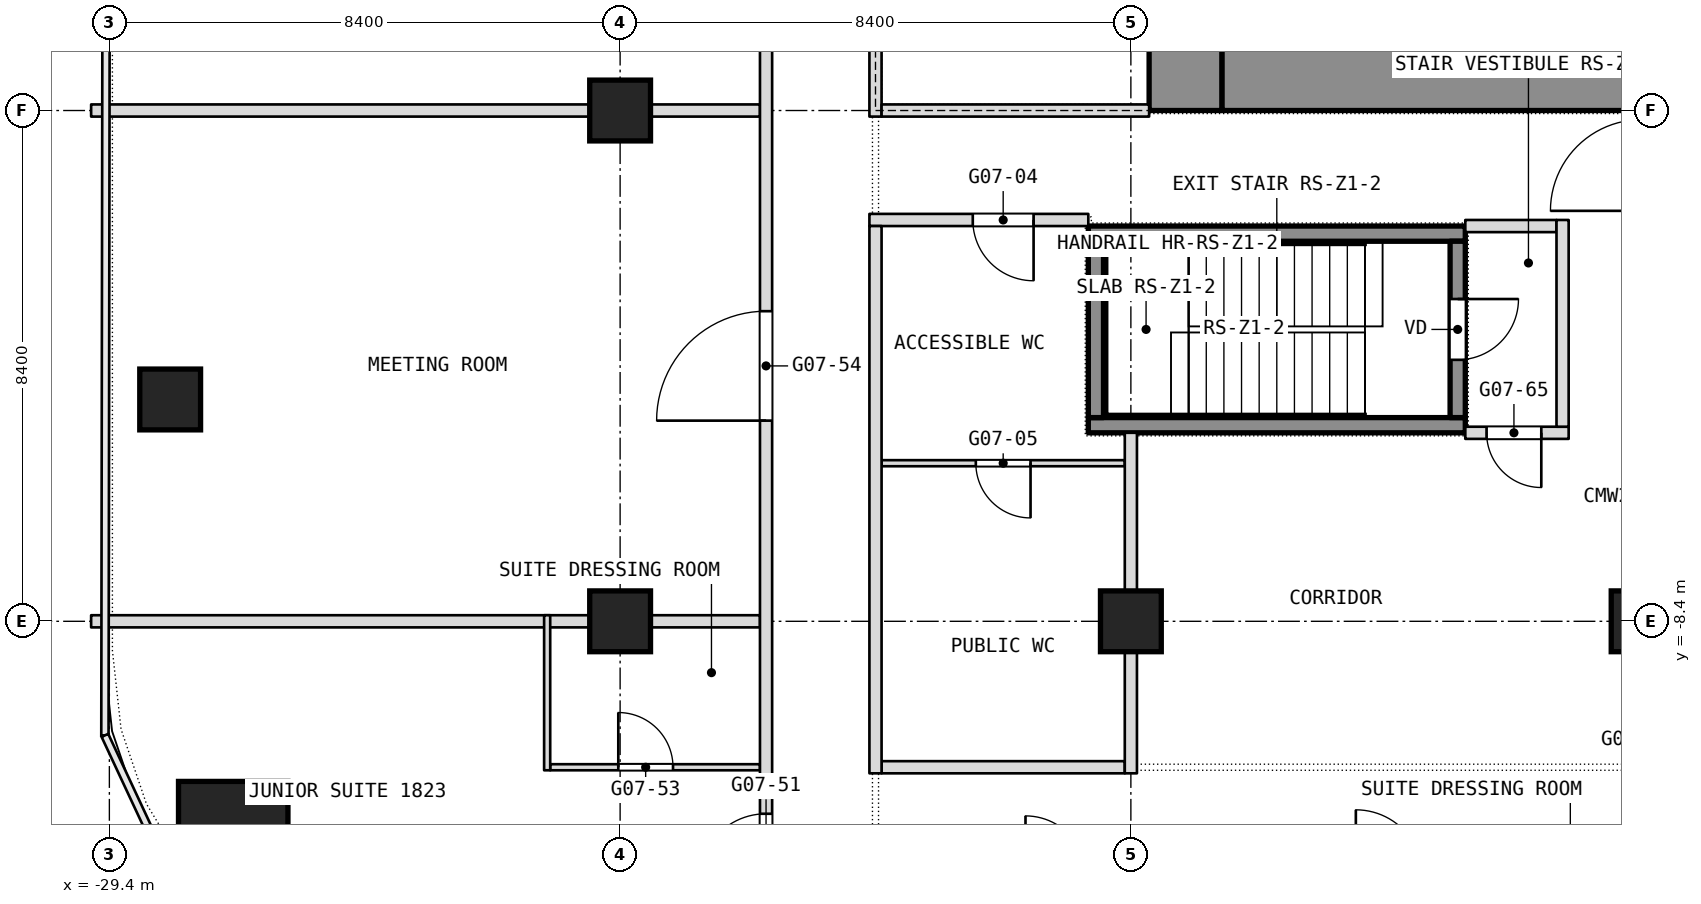
"""IFC4 building model, lengths in metres.
Left out: names, types, materials, properties, quantities, classifications, styles, units other than length and angle.
Written with IfcOpenShell. Run it as: python <this file> out.ifc"""

import sys

from ifc_helpers import new_model, si_unit, direction, frame, frame_2d, origin, origin_2d, place, context, subcontext, project, spatial, rectangle, extrude, element, fill, save


model = new_model("IFC4")
c1 = context("Model", 3, precision=1e-05, world=origin(), true_north=direction((0.0, 1.0)))
c2 = subcontext(c1, "Body", "Model", "MODEL_VIEW")
j1 = project(units=[si_unit("LENGTHUNIT", "METRE"), si_unit("PLANEANGLEUNIT", "RADIAN")], contexts=[c1])
p1 = place(None, origin())
s1 = spatial("IfcSite", under=j1, at=p1, CompositionType="ELEMENT")
p2 = place(p1, origin())
s2 = spatial("IfcBuilding", under=s1, at=p2, CompositionType="ELEMENT")
p3 = place(p2, frame((0.0, 0.0, 79.7)))
s3 = spatial("IfcBuildingStorey", under=s2, at=p3, CompositionType="ELEMENT", Elevation=79.7)
p4 = place(p3, frame((-11.7, 0.0, 0.0), z_axis=(0.0, 0.0, 1.0), x_axis=(0.0, 1.0, 0.0)))
e1 = element("IfcWall", 1, at=p4, inside=s3, PredefinedType="SHEAR", context=c2, shape_type="SweptSolid", body=[
    extrude(rectangle(XDim=16.8, YDim=1.2, at=frame_2d((8.4, 0.0))), origin(), (0.0, 0.0, 1.0), 3.6),
])
p5 = place(p4, frame((2.3, 0.0, 0.0)))
e2 = element("IfcOpeningElement", 2, at=p5, cuts=e1, PredefinedType="OPENING", context=c2, shape_type="SweptSolid", body=[
    extrude(rectangle(XDim=1.1, YDim=2.1, at=frame_2d((0.55, 1.05))), frame((0.0, 0.6, 0.0), z_axis=(0.0, -1.0, 0.0), x_axis=(1.0, 0.0, 0.0)), (0.0, 0.0, 1.0), 1.2),
])
p6 = place(p4, frame((4.85, 0.0, 0.0)))
e3 = element("IfcOpeningElement", 3, at=p6, cuts=e1, PredefinedType="OPENING", context=c2, shape_type="SweptSolid", body=[
    extrude(rectangle(XDim=1.1, YDim=2.1, at=frame_2d((0.55, 1.05))), frame((0.0, 0.6, 0.0), z_axis=(0.0, -1.0, 0.0), x_axis=(1.0, 0.0, 0.0)), (0.0, 0.0, 1.0), 1.2),
])
p7 = place(p4, frame((6.825, 0.0, 0.0)))
e4 = element("IfcOpeningElement", 4, at=p7, cuts=e1, PredefinedType="OPENING", context=c2, shape_type="SweptSolid", body=[
    extrude(rectangle(XDim=1.2, YDim=2.1, at=frame_2d((0.6, 1.05))), frame((0.0, 0.6, 0.0), z_axis=(0.0, -1.0, 0.0), x_axis=(1.0, 0.0, 0.0)), (0.0, 0.0, 1.0), 1.2),
])
p8 = place(p4, frame((13.4, 0.0, 0.0)))
e5 = element("IfcOpeningElement", 5, at=p8, cuts=e1, PredefinedType="OPENING", context=c2, shape_type="SweptSolid", body=[
    extrude(rectangle(XDim=1.1, YDim=2.1, at=frame_2d((0.55, 1.05))), frame((0.0, 0.6, 0.0), z_axis=(0.0, -1.0, 0.0), x_axis=(1.0, 0.0, 0.0)), (0.0, 0.0, 1.0), 1.2),
])
p9 = place(p4, frame((10.85, 0.0, 0.0)))
e6 = element("IfcOpeningElement", 6, at=p9, cuts=e1, PredefinedType="OPENING", context=c2, shape_type="SweptSolid", body=[
    extrude(rectangle(XDim=1.1, YDim=2.1, at=frame_2d((0.55, 1.05))), frame((0.0, 0.6, 0.0), z_axis=(0.0, -1.0, 0.0), x_axis=(1.0, 0.0, 0.0)), (0.0, 0.0, 1.0), 1.2),
])
p10 = place(p4, frame((8.775, 0.0, 0.0)))
e7 = element("IfcOpeningElement", 7, at=p10, cuts=e1, PredefinedType="OPENING", context=c2, shape_type="SweptSolid", body=[
    extrude(rectangle(XDim=1.2, YDim=2.1, at=frame_2d((0.6, 1.05))), frame((0.0, 0.6, 0.0), z_axis=(0.0, -1.0, 0.0), x_axis=(1.0, 0.0, 0.0)), (0.0, 0.0, 1.0), 1.2),
])
p11 = place(p3, frame((-11.1, 0.6, 0.0), z_axis=(0.0, 0.0, 1.0), x_axis=(1.0, 0.0, 0.0)))
e8 = element("IfcWall", 8, at=p11, inside=s3, PredefinedType="SHEAR", context=c2, shape_type="SweptSolid", body=[
    extrude(rectangle(XDim=22.2, YDim=1.2, at=frame_2d((11.1, 0.0))), origin(), (0.0, 0.0, 1.0), 3.6),
])
p12 = place(p3, frame((-27.363, -11.933, 0.0), z_axis=(0.0, 0.0, 1.0), x_axis=(1.0, 0.0, 0.0)))
e9 = element("IfcColumn", 9, at=p12, inside=s3, PredefinedType="COLUMN", context=c2, shape_type="SweptSolid", body=[
    extrude(rectangle(XDim=1.8, YDim=1.8, at=origin_2d()), origin(), (0.0, 0.0, 1.0), 3.6),
])
for number, where, z_axis, x_axis in (
    (10, (-21.0, -8.4, 0.0), (0.0, 0.0, 1.0), (1.0, 0.0, 0.0)),
    (11, (-21.0, 0.0, 0.0), (0.0, 0.0, 1.0), (1.0, 0.0, 0.0)),
    (12, (-12.6, -8.4, 0.0), (0.0, 0.0, 1.0), (1.0, 0.0, 0.0)),
    (13, (-4.2, -8.4, 0.0), (0.0, 0.0, 1.0), (1.0, 0.0, 0.0)),
    (14, (-28.4, -4.752, 0.0), (0.0, 0.0, 1.0), (1.0, 0.0, 0.0)),
):
    element("IfcColumn", number, at=place(p3, frame(where, z_axis=z_axis, x_axis=x_axis)), inside=s3, PredefinedType="COLUMN", context=c2, shape_type="SweptSolid", body=[
        extrude(rectangle(XDim=1.0, YDim=1.0, at=origin_2d()), origin(), (0.0, 0.0, 1.0), 3.6),
    ])
p13 = place(p3, frame((-22.15, -10.8, 0.0), z_axis=(0.0, 0.0, 1.0), x_axis=(1.0, 0.0, 0.0)))
e15 = element("IfcWall", 15, at=p13, inside=s3, PredefinedType="PARTITIONING", context=c2, shape_type="SweptSolid", body=[
    extrude(rectangle(XDim=3.45, YDim=0.1, at=frame_2d((1.725, 0.0))), origin(), (0.0, 0.0, 1.0), 3.34),
])
p14 = place(p13, frame((1.12, 0.0, 0.0)))
e16 = element("IfcOpeningElement", 16, at=p14, cuts=e15, PredefinedType="OPENING", context=c2, shape_type="SweptSolid", body=[
    extrude(rectangle(XDim=0.9, YDim=2.1, at=frame_2d((0.45, 1.05))), frame((0.0, 0.05, 0.0), z_axis=(0.0, -1.0, 0.0), x_axis=(1.0, 0.0, 0.0)), (0.0, 0.0, 1.0), 0.1),
])
p15 = place(p3, frame((-16.7, -10.8, 0.0), z_axis=(0.0, 0.0, 1.0), x_axis=(1.0, 0.0, 0.0)))
e17 = element("IfcWall", 17, at=p15, inside=s3, PredefinedType="PARTITIONING", context=c2, shape_type="SweptSolid", body=[
    extrude(rectangle(XDim=4.0, YDim=0.2, at=frame_2d((2.0, 0.0))), origin(), (0.0, 0.0, 1.0), 3.34),
])
p16 = place(p3, frame((-29.7, -8.4, 0.0), z_axis=(0.0, 0.0, 1.0), x_axis=(1.0, 0.0, 0.0)))
e18 = element("IfcWall", 18, at=p16, inside=s3, PredefinedType="PARTITIONING", context=c2, shape_type="SweptSolid", body=[
    extrude(rectangle(XDim=11.0, YDim=0.2, at=frame_2d((5.5, 0.0))), origin(), (0.0, 0.0, 1.0), 2.84),
])
p17 = place(p3, frame((-16.7, -5.8, 0.0), z_axis=(0.0, 0.0, 1.0), x_axis=(1.0, 0.0, 0.0)))
e19 = element("IfcWall", 19, at=p17, inside=s3, PredefinedType="PARTITIONING", context=c2, shape_type="SweptSolid", body=[
    extrude(rectangle(XDim=4.0, YDim=0.1, at=frame_2d((2.0, 0.0))), origin(), (0.0, 0.0, 1.0), 3.34),
])
p18 = place(p17, frame((1.55, 0.0, 0.0)))
e20 = element("IfcOpeningElement", 20, at=p18, cuts=e19, PredefinedType="OPENING", context=c2, shape_type="SweptSolid", body=[
    extrude(rectangle(XDim=0.9, YDim=2.1, at=frame_2d((0.45, 1.05))), frame((0.0, 0.05, 0.0), z_axis=(0.0, -1.0, 0.0), x_axis=(1.0, 0.0, 0.0)), (0.0, 0.0, 1.0), 0.1),
])
p19 = place(p3, frame((-7.1, -5.3, 0.0), z_axis=(0.0, 0.0, 1.0), x_axis=(1.0, 0.0, 0.0)))
e21 = element("IfcWall", 21, at=p19, inside=s3, PredefinedType="PARTITIONING", context=c2, shape_type="SweptSolid", body=[
    extrude(rectangle(XDim=1.7, YDim=0.2, at=frame_2d((0.85, 0.0))), origin(), (0.0, 0.0, 1.0), 3.34),
])
p20 = place(p19, frame((0.35, 0.0, 0.0)))
e22 = element("IfcOpeningElement", 22, at=p20, cuts=e21, PredefinedType="OPENING", context=c2, shape_type="SweptSolid", body=[
    extrude(rectangle(XDim=0.9, YDim=2.1, at=frame_2d((0.45, 1.05))), frame((0.0, 0.1, 0.0), z_axis=(0.0, -1.0, 0.0), x_axis=(1.0, 0.0, 0.0)), (0.0, 0.0, 1.0), 0.2),
])
p21 = place(p3, frame((-7.1, -1.9, 0.0), z_axis=(0.0, 0.0, 1.0), x_axis=(1.0, 0.0, 0.0)))
e23 = element("IfcWall", 23, at=p21, inside=s3, PredefinedType="PARTITIONING", context=c2, shape_type="SweptSolid", body=[
    extrude(rectangle(XDim=1.5, YDim=0.2, at=frame_2d((0.75, 0.0))), origin(), (0.0, 0.0, 1.0), 3.34),
])
p22 = place(p3, frame((-16.9, -1.8, 0.0), z_axis=(0.0, 0.0, 1.0), x_axis=(1.0, 0.0, 0.0)))
e24 = element("IfcWall", 24, at=p22, inside=s3, PredefinedType="PARTITIONING", context=c2, shape_type="SweptSolid", body=[
    extrude(rectangle(XDim=3.6, YDim=0.2, at=frame_2d((1.8, 0.0))), origin(), (0.0, 0.0, 1.0), 3.34),
])
p23 = place(p22, frame((1.7, 0.0, 0.0)))
e25 = element("IfcOpeningElement", 25, at=p23, cuts=e24, PredefinedType="OPENING", context=c2, shape_type="SweptSolid", body=[
    extrude(rectangle(XDim=1.0, YDim=2.1, at=frame_2d((0.5, 1.05))), frame((0.0, 0.1, 0.0), z_axis=(0.0, -1.0, 0.0), x_axis=(1.0, 0.0, 0.0)), (0.0, 0.0, 1.0), 0.2),
])
p24 = place(p3, frame((-29.7, 0.0, 0.0), z_axis=(0.0, 0.0, 1.0), x_axis=(1.0, 0.0, 0.0)))
e26 = element("IfcWall", 26, at=p24, inside=s3, PredefinedType="PARTITIONING", context=c2, shape_type="SweptSolid", body=[
    extrude(rectangle(XDim=11.0, YDim=0.2, at=frame_2d((5.5, 0.0))), origin(), (0.0, 0.0, 1.0), 2.84),
])
p25 = place(p3, frame((-5.5, -5.2, 0.0), z_axis=(0.0, 0.0, 1.0), x_axis=(0.0, 1.0, 0.0)))
e27 = element("IfcWall", 27, at=p25, inside=s3, PredefinedType="PARTITIONING", context=c2, shape_type="SweptSolid", body=[
    extrude(rectangle(XDim=3.4, YDim=0.2, at=frame_2d((1.7, 0.0))), origin(), (0.0, 0.0, 1.0), 3.34),
])
p26 = place(p3, frame((-12.6, -10.9, 0.0), z_axis=(0.0, 0.0, 1.0), x_axis=(0.0, 1.0, 0.0)))
e28 = element("IfcWall", 28, at=p26, inside=s3, PredefinedType="PARTITIONING", context=c2, shape_type="SweptSolid", body=[
    extrude(rectangle(XDim=5.6, YDim=0.2, at=frame_2d((2.8, 0.0))), origin(), (0.0, 0.0, 1.0), 3.34),
])
p27 = place(p3, frame((-16.8, -10.9, 0.0), z_axis=(0.0, 0.0, 1.0), x_axis=(0.0, 1.0, 0.0)))
e29 = element("IfcWall", 29, at=p27, inside=s3, PredefinedType="PARTITIONING", context=c2, shape_type="SweptSolid", body=[
    extrude(rectangle(XDim=9.0, YDim=0.2, at=frame_2d((4.5, 0.0))), origin(), (0.0, 0.0, 1.0), 3.34),
])
p28 = place(p3, frame((-18.6, -16.665, 0.0), z_axis=(0.0, 0.0, 1.0), x_axis=(0.0, 1.0, 0.0)))
e30 = element("IfcWall", 30, at=p28, inside=s3, PredefinedType="PARTITIONING", context=c2, shape_type="SweptSolid", body=[
    extrude(rectangle(XDim=23.565, YDim=0.2, at=frame_2d((11.782, 0.0))), origin(), (0.0, 0.0, 1.0), 3.34),
])
p29 = place(p28, frame((4.0, 0.0, 0.0)))
e31 = element("IfcOpeningElement", 31, at=p29, cuts=e30, PredefinedType="OPENING", context=c2, shape_type="SweptSolid", body=[
    extrude(rectangle(XDim=1.1, YDim=2.1, at=frame_2d((0.55, 1.05))), frame((0.0, 0.1, 0.0), z_axis=(0.0, -1.0, 0.0), x_axis=(1.0, 0.0, 0.0)), (0.0, 0.0, 1.0), 0.2),
])
p30 = place(p28, frame((11.565, 0.0, 0.0)))
e32 = element("IfcOpeningElement", 32, at=p30, cuts=e30, PredefinedType="OPENING", context=c2, shape_type="SweptSolid", body=[
    extrude(rectangle(XDim=1.8, YDim=2.1, at=frame_2d((0.9, 1.05))), frame((0.0, 0.1, 0.0), z_axis=(0.0, -1.0, 0.0), x_axis=(1.0, 0.0, 0.0)), (0.0, 0.0, 1.0), 0.2),
])
p31 = place(p28, frame((19.965, 0.0, 0.0)))
e33 = element("IfcOpeningElement", 33, at=p31, cuts=e30, PredefinedType="OPENING", context=c2, shape_type="SweptSolid", body=[
    extrude(rectangle(XDim=1.8, YDim=2.1, at=frame_2d((0.9, 1.05))), frame((0.0, 0.1, 0.0), z_axis=(0.0, -1.0, 0.0), x_axis=(1.0, 0.0, 0.0)), (0.0, 0.0, 1.0), 0.2),
])
p32 = place(p3, frame((-22.2, -10.85, 0.0), z_axis=(0.0, 0.0, 1.0), x_axis=(0.0, 1.0, 0.0)))
e34 = element("IfcWall", 34, at=p32, inside=s3, PredefinedType="PARTITIONING", context=c2, shape_type="SweptSolid", body=[
    extrude(rectangle(XDim=2.55, YDim=0.1, at=frame_2d((1.275, 0.0))), origin(), (0.0, 0.0, 1.0), 3.34),
])
p33 = place(p3, frame((-16.8, -0.1, 0.0), z_axis=(0.0, 0.0, 1.0), x_axis=(0.0, 1.0, 0.0)))
e35 = element("IfcWall", 35, at=p33, inside=s3, PredefinedType="PARTITIONING", context=c2, shape_type="SweptSolid", body=[
    extrude(rectangle(XDim=17.0, YDim=0.2, at=frame_2d((8.5, 0.0))), origin(), (0.0, 0.0, 1.0), 3.34),
])
p34 = place(p33, frame((2.2, 0.0, 0.0)))
e36 = element("IfcOpeningElement", 36, at=p34, cuts=e35, PredefinedType="OPENING", context=c2, shape_type="SweptSolid", body=[
    extrude(rectangle(XDim=1.8, YDim=2.1, at=frame_2d((0.9, 1.05))), frame((0.0, 0.1, 0.0), z_axis=(0.0, -1.0, 0.0), x_axis=(1.0, 0.0, 0.0)), (0.0, 0.0, 1.0), 0.2),
])
p35 = place(p33, frame((7.2, 0.0, 0.0)))
e37 = element("IfcOpeningElement", 37, at=p35, cuts=e35, PredefinedType="OPENING", context=c2, shape_type="SweptSolid", body=[
    extrude(rectangle(XDim=1.8, YDim=2.1, at=frame_2d((0.9, 1.05))), frame((0.0, 0.1, 0.0), z_axis=(0.0, -1.0, 0.0), x_axis=(1.0, 0.0, 0.0)), (0.0, 0.0, 1.0), 0.2),
])
p36 = place(p3, frame((-16.7, 0.0, 0.0), z_axis=(0.0, 0.0, 1.0), x_axis=(1.0, 0.0, 0.0)))
e38 = element("IfcWall", 38, at=p36, inside=s3, PredefinedType="PARTITIONING", context=c2, shape_type="SweptSolid", body=[
    extrude(rectangle(XDim=4.4, YDim=0.2, at=frame_2d((2.2, 0.0))), origin(), (0.0, 0.0, 1.0), 2.84),
])
for number, where, z_axis, x_axis in (
    (39, (-13.3, -5.175, 0.1), (0.0, 0.0, 1.0), (1.0, 0.0, 0.0)),
    (40, (-13.3, -2.025, 0.1), (0.0, 0.0, 1.0), (1.0, 0.0, 0.0)),
):
    element("IfcWall", number, at=place(p3, frame(where, z_axis=z_axis, x_axis=x_axis)), inside=s3, PredefinedType="SHEAR", context=c2, shape_type="SweptSolid", body=[
        extrude(rectangle(XDim=6.2, YDim=0.25, at=frame_2d((3.1, 0.0))), origin(), (0.0, 0.0, 1.0), 3.6),
    ])
p37 = place(p3, frame((-13.175, -5.05, 0.1), z_axis=(0.0, 0.0, 1.0), x_axis=(0.0, 1.0, 0.0)))
e41 = element("IfcWall", 41, at=p37, inside=s3, PredefinedType="SHEAR", context=c2, shape_type="SweptSolid", body=[
    extrude(rectangle(XDim=2.9, YDim=0.25, at=frame_2d((1.45, 0.0))), origin(), (0.0, 0.0, 1.0), 3.6),
])
p38 = place(p3, frame((-7.225, -5.05, 0.1), z_axis=(0.0, 0.0, 1.0), x_axis=(0.0, 1.0, 0.0)))
e42 = element("IfcWall", 42, at=p38, inside=s3, PredefinedType="SHEAR", context=c2, shape_type="SweptSolid", body=[
    extrude(rectangle(XDim=2.9, YDim=0.25, at=frame_2d((1.45, 0.0))), origin(), (0.0, 0.0, 1.0), 3.6),
])
p39 = place(p38, frame((0.95, 0.0, 0.0)))
e43 = element("IfcOpeningElement", 43, at=p39, cuts=e42, PredefinedType="OPENING", context=c2, shape_type="SweptSolid", body=[
    extrude(rectangle(XDim=1.0, YDim=2.1, at=frame_2d((0.5, 1.05))), frame((0.0, 0.125, 0.0), z_axis=(0.0, -1.0, 0.0), x_axis=(1.0, 0.0, 0.0)), (0.0, 0.0, 1.0), 0.25),
])
p40 = place(p14, origin())
e44 = element("IfcDoor", 44, at=p40, inside=s3, OperationType="SINGLE_SWING_LEFT", PredefinedType="DOOR", context=c2, shape_type="SweptSolid", body=[
    extrude(rectangle(XDim=0.9, YDim=2.1, at=frame_2d((0.45, 1.05))), frame((0.0, 0.025, 0.0), z_axis=(0.0, -1.0, 0.0), x_axis=(1.0, 0.0, 0.0)), (0.0, 0.0, 1.0), 0.05),
])
fill(e16, e44)
p41 = place(p18, origin())
e45 = element("IfcDoor", 45, at=p41, inside=s3, OperationType="SINGLE_SWING_LEFT", PredefinedType="DOOR", context=c2, shape_type="SweptSolid", body=[
    extrude(rectangle(XDim=0.9, YDim=2.1, at=frame_2d((0.45, 1.05))), frame((0.0, 0.025, 0.0), z_axis=(0.0, -1.0, 0.0), x_axis=(1.0, 0.0, 0.0)), (0.0, 0.0, 1.0), 0.05),
])
fill(e20, e45)
p42 = place(p20, origin())
e46 = element("IfcDoor", 46, at=p42, inside=s3, OperationType="SINGLE_SWING_RIGHT", PredefinedType="DOOR", context=c2, shape_type="SweptSolid", body=[
    extrude(rectangle(XDim=0.9, YDim=2.1, at=frame_2d((0.45, 1.05))), frame((0.0, 0.025, 0.0), z_axis=(0.0, -1.0, 0.0), x_axis=(1.0, 0.0, 0.0)), (0.0, 0.0, 1.0), 0.05),
])
fill(e22, e46)
p43 = place(p23, origin())
e47 = element("IfcDoor", 47, at=p43, inside=s3, OperationType="SINGLE_SWING_RIGHT", PredefinedType="DOOR", context=c2, shape_type="SweptSolid", body=[
    extrude(rectangle(XDim=1.0, YDim=2.1, at=frame_2d((0.5, 1.05))), frame((0.0, 0.025, 0.0), z_axis=(0.0, -1.0, 0.0), x_axis=(1.0, 0.0, 0.0)), (0.0, 0.0, 1.0), 0.05),
])
fill(e25, e47)
p44 = place(p29, origin())
e48 = element("IfcDoor", 48, at=p44, inside=s3, OperationType="SINGLE_SWING_LEFT", PredefinedType="DOOR", context=c2, shape_type="SweptSolid", body=[
    extrude(rectangle(XDim=1.1, YDim=2.1, at=frame_2d((0.55, 1.05))), frame((0.0, 0.025, 0.0), z_axis=(0.0, -1.0, 0.0), x_axis=(1.0, 0.0, 0.0)), (0.0, 0.0, 1.0), 0.05),
])
fill(e31, e48)
p45 = place(p30, origin())
e49 = element("IfcDoor", 49, at=p45, inside=s3, OperationType="DOUBLE_DOOR_SINGLE_SWING", PredefinedType="DOOR", context=c2, shape_type="SweptSolid", body=[
    extrude(rectangle(XDim=1.8, YDim=2.1, at=frame_2d((0.9, 1.05))), frame((0.0, 0.025, 0.0), z_axis=(0.0, -1.0, 0.0), x_axis=(1.0, 0.0, 0.0)), (0.0, 0.0, 1.0), 0.05),
])
fill(e32, e49)
p46 = place(p39, origin())
e50 = element("IfcDoor", 50, at=p46, inside=s3, OperationType="SINGLE_SWING_LEFT", PredefinedType="DOOR", context=c2, shape_type="SweptSolid", body=[
    extrude(rectangle(XDim=1.0, YDim=2.1, at=frame_2d((0.5, 1.05))), frame((0.0, 0.025, 0.0), z_axis=(0.0, -1.0, 0.0), x_axis=(1.0, 0.0, 0.0)), (0.0, 0.0, 1.0), 0.05),
])
fill(e43, e50)
save(model, sys.argv[1])
